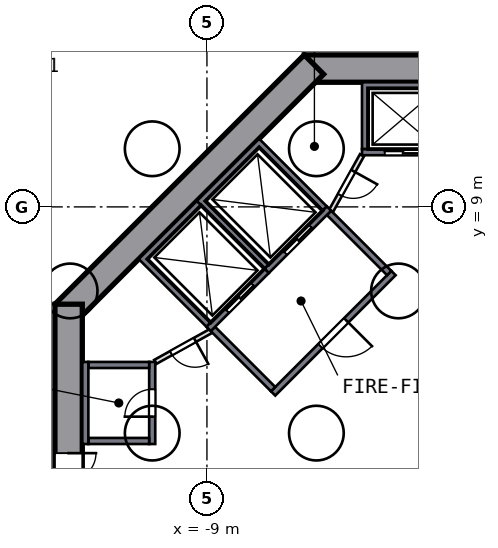
"""IFC4 building model, lengths in metres.
Left out: names, types, materials, properties, quantities, classifications, styles, units other than length and angle.
Written with IfcOpenShell. Run it as: python <this file> out.ifc"""

import sys

from ifc_helpers import new_model, si_unit, direction, frame, frame_2d, origin, place, context, subcontext, project, spatial, polyline, rectangle, outline, extrude, element, fill, save


model = new_model("IFC4")
c1 = context("Model", 3, precision=1e-05, world=origin(), true_north=direction((0.0, 1.0)))
c2 = subcontext(c1, "Body", "Model", "MODEL_VIEW")
j1 = project(units=[si_unit("LENGTHUNIT", "METRE"), si_unit("PLANEANGLEUNIT", "RADIAN")], contexts=[c1])
p1 = place(None, origin())
s1 = spatial("IfcSite", under=j1, at=p1, CompositionType="ELEMENT")
p2 = place(p1, origin())
s2 = spatial("IfcBuilding", under=s1, at=p2, CompositionType="ELEMENT")
p3 = place(p2, frame((0.0, 0.0, -11.7)))
s3 = spatial("IfcBuildingStorey", under=s2, at=p3, CompositionType="ELEMENT", Elevation=-11.7)
p4 = place(p3, frame((5.799, 13.55, 0.0), z_axis=(0.0, 0.0, 1.0), x_axis=(-1.0, 0.0, 0.0)))
e1 = element("IfcWall", 1, at=p4, inside=s3, PredefinedType="SHEAR", context=c2, shape_type="SweptSolid", body=[
    extrude(rectangle(XDim=11.598, YDim=0.9, at=frame_2d((5.799, 0.0))), origin(), (0.0, 0.0, 1.0), 3.9),
])
p5 = place(p4, frame((4.899, 0.0, 0.0)))
e2 = element("IfcOpeningElement", 2, at=p5, cuts=e1, PredefinedType="OPENING", context=c2, shape_type="SweptSolid", body=[
    extrude(rectangle(XDim=1.8, YDim=2.1, at=frame_2d((0.9, 1.05))), frame((0.0, 0.46, 0.0), z_axis=(0.0, -1.0, 0.0), x_axis=(1.0, 0.0, 0.0)), (0.0, 0.0, 1.0), 0.92),
])
p6 = place(p3, frame((-5.481, 13.682, 0.0), z_axis=(0.0, 0.0, 1.0), x_axis=(-0.707106781, -0.707106781, 0.0)))
e3 = element("IfcWall", 3, at=p6, inside=s3, PredefinedType="SHEAR", context=c2, shape_type="SweptSolid", body=[
    extrude(rectangle(XDim=11.598, YDim=0.9, at=frame_2d((5.799, 0.0))), origin(), (0.0, 0.0, 1.0), 3.9),
])
p7 = place(p3, frame((-13.55, 5.799, 0.0), z_axis=(0.0, 0.0, 1.0), x_axis=(0.0, -1.0, 0.0)))
e4 = element("IfcWall", 4, at=p7, inside=s3, PredefinedType="SHEAR", context=c2, shape_type="SweptSolid", body=[
    extrude(rectangle(XDim=11.598, YDim=0.9, at=frame_2d((5.799, 0.0))), origin(), (0.0, 0.0, 1.0), 3.9),
])
p8 = place(p7, frame((4.899, 0.0, 0.0)))
e5 = element("IfcOpeningElement", 5, at=p8, cuts=e4, PredefinedType="OPENING", context=c2, shape_type="SweptSolid", body=[
    extrude(rectangle(XDim=1.8, YDim=2.1, at=frame_2d((0.9, 1.05))), frame((0.0, 0.46, 0.0), z_axis=(0.0, -1.0, 0.0), x_axis=(1.0, 0.0, 0.0)), (0.0, 0.0, 1.0), 0.92),
])
p9 = place(p3, origin())
e6 = element("IfcWall", 6, at=p9, inside=s3, PredefinedType="SOLIDWALL", context=c2, shape_type="SweptSolid", body=[
    extrude(outline(polyline([(-3.9, 10.9), (-3.9, 13.1), (-1.2, 13.1), (-1.2, 10.9), (-1.4, 10.9), (-1.4, 12.9), (-3.7, 12.9), (-3.7, 10.9), (-3.9, 10.9)])), origin(), (0.0, 0.0, 1.0), 3.45),
])
p10 = place(p3, frame((-1.2, 10.8, 0.0), z_axis=(0.0, 0.0, 1.0), x_axis=(-1.0, 0.0, 0.0)))
e7 = element("IfcWall", 7, at=p10, inside=s3, PredefinedType="SOLIDWALL", context=c2, shape_type="SweptSolid", body=[
    extrude(rectangle(XDim=2.7, YDim=0.2, at=frame_2d((1.35, 0.0))), origin(), (0.0, 0.0, 1.0), 3.45),
])
p11 = place(p10, frame((0.75, 0.0, 0.0)))
e8 = element("IfcOpeningElement", 8, at=p11, cuts=e7, PredefinedType="OPENING", context=c2, shape_type="SweptSolid", body=[
    extrude(rectangle(XDim=1.2, YDim=2.1, at=frame_2d((0.6, 1.05))), frame((0.0, 0.11, 0.0), z_axis=(0.0, -1.0, 0.0), x_axis=(1.0, 0.0, 0.0)), (0.0, 0.0, 1.0), 0.22),
])
p12 = place(p3, origin())
e9 = element("IfcWall", 9, at=p12, inside=s3, PredefinedType="SOLIDWALL", context=c2, shape_type="SweptSolid", body=[
    extrude(outline(polyline([(-10.9, 1.2), (-12.9, 1.2), (-12.9, 1.4), (-10.9, 1.4), (-10.9, 1.2)])), origin(), (0.0, 0.0, 1.0), 3.45),
])
p13 = place(p3, origin())
e10 = element("IfcWall", 10, at=p13, inside=s3, PredefinedType="SOLIDWALL", context=c2, shape_type="SweptSolid", body=[
    extrude(outline(polyline([(-10.9, 3.7), (-12.9, 3.7), (-12.9, 3.9), (-10.9, 3.9), (-10.9, 3.7)])), origin(), (0.0, 0.0, 1.0), 3.45),
])
p14 = place(p3, origin())
e11 = element("IfcWall", 11, at=p14, inside=s3, PredefinedType="SOLIDWALL", context=c2, shape_type="SweptSolid", body=[
    extrude(outline(polyline([(-12.9, 1.2), (-13.1, 1.2), (-13.1, 3.9), (-12.9, 3.9), (-12.9, 1.2)])), origin(), (0.0, 0.0, 1.0), 3.45),
])
p15 = place(p3, frame((-10.8, 1.2, 0.0), z_axis=(0.0, 0.0, 1.0), x_axis=(0.0, 1.0, 0.0)))
e12 = element("IfcWall", 12, at=p15, inside=s3, PredefinedType="SOLIDWALL", context=c2, shape_type="SweptSolid", body=[
    extrude(rectangle(XDim=2.7, YDim=0.2, at=frame_2d((1.35, 0.0))), origin(), (0.0, 0.0, 1.0), 3.45),
])
p16 = place(p15, frame((0.9, 0.0, 0.0)))
e13 = element("IfcOpeningElement", 13, at=p16, cuts=e12, PredefinedType="OPENING", context=c2, shape_type="SweptSolid", body=[
    extrude(rectangle(XDim=0.9, YDim=2.1, at=frame_2d((0.45, 1.05))), frame((0.0, 0.11, 0.0), z_axis=(0.0, -1.0, 0.0), x_axis=(1.0, 0.0, 0.0)), (0.0, 0.0, 1.0), 0.22),
])
p17 = place(p3, origin())
e14 = element("IfcWall", 14, at=p17, inside=s3, PredefinedType="SOLIDWALL", context=c2, shape_type="SweptSolid", body=[
    extrude(outline(polyline([(-9.334, 9.192), (-7.283, 11.243), (-5.056, 9.016), (-5.197, 8.874), (-7.283, 10.96), (-9.051, 9.192), (-6.965, 7.106), (-7.106, 6.965), (-9.334, 9.192)])), origin(), (0.0, 0.0, 1.0), 3.45),
])
p18 = place(p3, frame((-4.985, 8.945, 0.0), z_axis=(0.0, 0.0, 1.0), x_axis=(-0.707106781, -0.707106781, 0.0)))
e15 = element("IfcWall", 15, at=p18, inside=s3, PredefinedType="SOLIDWALL", context=c2, shape_type="SweptSolid", body=[
    extrude(rectangle(XDim=2.9, YDim=0.2, at=frame_2d((1.45, 0.0))), origin(), (0.0, 0.0, 1.0), 3.45),
])
p19 = place(p18, frame((0.85, 0.0, 0.0)))
e16 = element("IfcOpeningElement", 16, at=p19, cuts=e15, PredefinedType="OPENING", context=c2, shape_type="SweptSolid", body=[
    extrude(rectangle(XDim=1.2, YDim=2.1, at=frame_2d((0.6, 1.05))), frame((0.0, 0.11, 0.0), z_axis=(0.0, -1.0, 0.0), x_axis=(1.0, 0.0, 0.0)), (0.0, 0.0, 1.0), 0.22),
])
p20 = place(p3, origin())
e17 = element("IfcWall", 17, at=p20, inside=s3, PredefinedType="SOLIDWALL", context=c2, shape_type="SweptSolid", body=[
    extrude(outline(polyline([(-11.243, 7.283), (-9.334, 9.192), (-9.192, 9.051), (-10.96, 7.283), (-8.874, 5.197), (-9.016, 5.056), (-11.243, 7.283)])), origin(), (0.0, 0.0, 1.0), 3.45),
])
p21 = place(p3, frame((-7.036, 6.894, 0.0), z_axis=(0.0, 0.0, 1.0), x_axis=(-0.707106781, -0.707106781, 0.0)))
e18 = element("IfcWall", 18, at=p21, inside=s3, PredefinedType="SOLIDWALL", context=c2, shape_type="SweptSolid", body=[
    extrude(rectangle(XDim=2.7, YDim=0.2, at=frame_2d((1.35, 0.0))), origin(), (0.0, 0.0, 1.0), 3.45),
])
p22 = place(p21, frame((0.65, 0.0, 0.0)))
e19 = element("IfcOpeningElement", 19, at=p22, cuts=e18, PredefinedType="OPENING", context=c2, shape_type="SweptSolid", body=[
    extrude(rectangle(XDim=1.2, YDim=2.1, at=frame_2d((0.6, 1.05))), frame((0.0, 0.11, 0.0), z_axis=(0.0, -1.0, 0.0), x_axis=(1.0, 0.0, 0.0)), (0.0, 0.0, 1.0), 0.22),
])
p23 = place(p3, frame((-2.864, 6.823, 0.0), z_axis=(0.0, 0.0, 1.0), x_axis=(-0.707106781, -0.707106781, 0.0)))
e20 = element("IfcWall", 20, at=p23, inside=s3, PredefinedType="SOLIDWALL", context=c2, shape_type="SweptSolid", body=[
    extrude(rectangle(XDim=5.6, YDim=0.2, at=frame_2d((2.8, 0.0))), origin(), (0.0, 0.0, 1.0), 3.45),
])
p24 = place(p23, frame((2.2, 0.0, 0.0)))
e21 = element("IfcOpeningElement", 21, at=p24, cuts=e20, PredefinedType="OPENING", context=c2, shape_type="SweptSolid", body=[
    extrude(rectangle(XDim=1.2, YDim=2.1, at=frame_2d((0.6, 1.05))), frame((0.0, 0.11, 0.0), z_axis=(0.0, -1.0, 0.0), x_axis=(1.0, 0.0, 0.0)), (0.0, 0.0, 1.0), 0.22),
])
for number, where, z_axis, x_axis in (
    (22, (-3.005, 6.823, 0.0), (0.0, 0.0, 1.0), (-0.707, 0.707, 0.0)),
    (23, (-6.823, 3.005, 0.0), (0.0, 0.0, 1.0), (-0.707, 0.707, 0.0)),
):
    element("IfcWall", number, at=place(p3, frame(where, z_axis=z_axis, x_axis=x_axis)), inside=s3, PredefinedType="SOLIDWALL", context=c2, shape_type="SweptSolid", body=[
        extrude(rectangle(XDim=2.8, YDim=0.2, at=frame_2d((1.4, 0.0))), origin(), (0.0, 0.0, 1.0), 3.45),
    ])
p25 = place(p3, frame((-3.9, 10.7, 0.0), z_axis=(0.0, 0.0, 1.0), x_axis=(-0.485692555, -0.874129705, 0.0)))
e24 = element("IfcWall", 24, at=p25, inside=s3, PredefinedType="PARTITIONING", context=c2, shape_type="SweptSolid", body=[
    extrude(rectangle(XDim=2.089, YDim=0.15, at=frame_2d((1.044, 0.0))), origin(), (0.0, 0.0, 1.0), 3.45),
])
p26 = place(p25, frame((0.594, 0.0, 0.0)))
e25 = element("IfcOpeningElement", 25, at=p26, cuts=e24, PredefinedType="OPENING", context=c2, shape_type="SweptSolid", body=[
    extrude(rectangle(XDim=0.9, YDim=2.1, at=frame_2d((0.45, 1.05))), frame((0.0, 0.085, 0.0), z_axis=(0.0, -1.0, 0.0), x_axis=(1.0, 0.0, 0.0)), (0.0, 0.0, 1.0), 0.17),
])
p27 = place(p3, frame((-8.874, 4.914, 0.0), z_axis=(0.0, 0.0, 1.0), x_axis=(-0.874129705, -0.485692555, 0.0)))
e26 = element("IfcWall", 26, at=p27, inside=s3, PredefinedType="PARTITIONING", context=c2, shape_type="SweptSolid", body=[
    extrude(rectangle(XDim=2.089, YDim=0.15, at=frame_2d((1.044, 0.0))), origin(), (0.0, 0.0, 1.0), 3.45),
])
p28 = place(p27, frame((0.594, 0.0, 0.0)))
e27 = element("IfcOpeningElement", 27, at=p28, cuts=e26, PredefinedType="OPENING", context=c2, shape_type="SweptSolid", body=[
    extrude(rectangle(XDim=0.9, YDim=2.1, at=frame_2d((0.45, 1.05))), frame((0.0, 0.085, 0.0), z_axis=(0.0, -1.0, 0.0), x_axis=(1.0, 0.0, 0.0)), (0.0, 0.0, 1.0), 0.17),
])
p29 = place(p16, origin())
e28 = element("IfcDoor", 28, at=p29, inside=s3, OperationType="SINGLE_SWING_LEFT", PredefinedType="DOOR", context=c2, shape_type="SweptSolid", body=[
    extrude(rectangle(XDim=0.9, YDim=2.1, at=frame_2d((0.45, 1.05))), frame((0.0, 0.025, 0.0), z_axis=(0.0, -1.0, 0.0), x_axis=(1.0, 0.0, 0.0)), (0.0, 0.0, 1.0), 0.05),
])
fill(e13, e28)
p30 = place(p11, origin())
e29 = element("IfcDoor", 29, at=p30, inside=s3, OperationType="DOUBLE_DOOR_SLIDING", PredefinedType="DOOR", context=c2, shape_type="SweptSolid", body=[
    extrude(rectangle(XDim=1.2, YDim=2.1, at=frame_2d((0.6, 1.05))), frame((0.0, 0.025, 0.0), z_axis=(0.0, -1.0, 0.0), x_axis=(1.0, 0.0, 0.0)), (0.0, 0.0, 1.0), 0.05),
])
fill(e8, e29)
p31 = place(p19, origin())
e30 = element("IfcDoor", 30, at=p31, inside=s3, OperationType="DOUBLE_DOOR_SLIDING", PredefinedType="DOOR", context=c2, shape_type="SweptSolid", body=[
    extrude(rectangle(XDim=1.2, YDim=2.1, at=frame_2d((0.6, 1.05))), frame((0.0, 0.025, 0.0), z_axis=(0.0, -1.0, 0.0), x_axis=(1.0, 0.0, 0.0)), (0.0, 0.0, 1.0), 0.05),
])
fill(e16, e30)
p32 = place(p22, origin())
e31 = element("IfcDoor", 31, at=p32, inside=s3, OperationType="DOUBLE_DOOR_SLIDING", PredefinedType="DOOR", context=c2, shape_type="SweptSolid", body=[
    extrude(rectangle(XDim=1.2, YDim=2.1, at=frame_2d((0.6, 1.05))), frame((0.0, 0.025, 0.0), z_axis=(0.0, -1.0, 0.0), x_axis=(1.0, 0.0, 0.0)), (0.0, 0.0, 1.0), 0.05),
])
fill(e19, e31)
p33 = place(p8, origin())
e32 = element("IfcDoor", 32, at=p33, inside=s3, OperationType="DOUBLE_DOOR_SINGLE_SWING", PredefinedType="DOOR", context=c2, shape_type="SweptSolid", body=[
    extrude(rectangle(XDim=1.8, YDim=2.1, at=frame_2d((0.9, 1.05))), frame((0.0, 0.025, 0.0), z_axis=(0.0, -1.0, 0.0), x_axis=(1.0, 0.0, 0.0)), (0.0, 0.0, 1.0), 0.05),
])
fill(e5, e32)
p34 = place(p24, origin())
e33 = element("IfcDoor", 33, at=p34, inside=s3, OperationType="SINGLE_SWING_LEFT", PredefinedType="DOOR", context=c2, shape_type="SweptSolid", body=[
    extrude(rectangle(XDim=1.2, YDim=2.1, at=frame_2d((0.6, 1.05))), frame((0.0, 0.025, 0.0), z_axis=(0.0, -1.0, 0.0), x_axis=(1.0, 0.0, 0.0)), (0.0, 0.0, 1.0), 0.05),
])
fill(e21, e33)
p35 = place(p26, origin())
e34 = element("IfcDoor", 34, at=p35, inside=s3, OperationType="SINGLE_SWING_LEFT", PredefinedType="DOOR", context=c2, shape_type="SweptSolid", body=[
    extrude(rectangle(XDim=0.9, YDim=2.1, at=frame_2d((0.45, 1.05))), frame((0.0, 0.025, 0.0), z_axis=(0.0, -1.0, 0.0), x_axis=(1.0, 0.0, 0.0)), (0.0, 0.0, 1.0), 0.05),
])
fill(e25, e34)
p36 = place(p28, origin())
e35 = element("IfcDoor", 35, at=p36, inside=s3, OperationType="SINGLE_SWING_LEFT", PredefinedType="DOOR", context=c2, shape_type="SweptSolid", body=[
    extrude(rectangle(XDim=0.9, YDim=2.1, at=frame_2d((0.45, 1.05))), frame((0.0, 0.025, 0.0), z_axis=(0.0, -1.0, 0.0), x_axis=(1.0, 0.0, 0.0)), (0.0, 0.0, 1.0), 0.05),
])
fill(e27, e35)
save(model, sys.argv[1])
